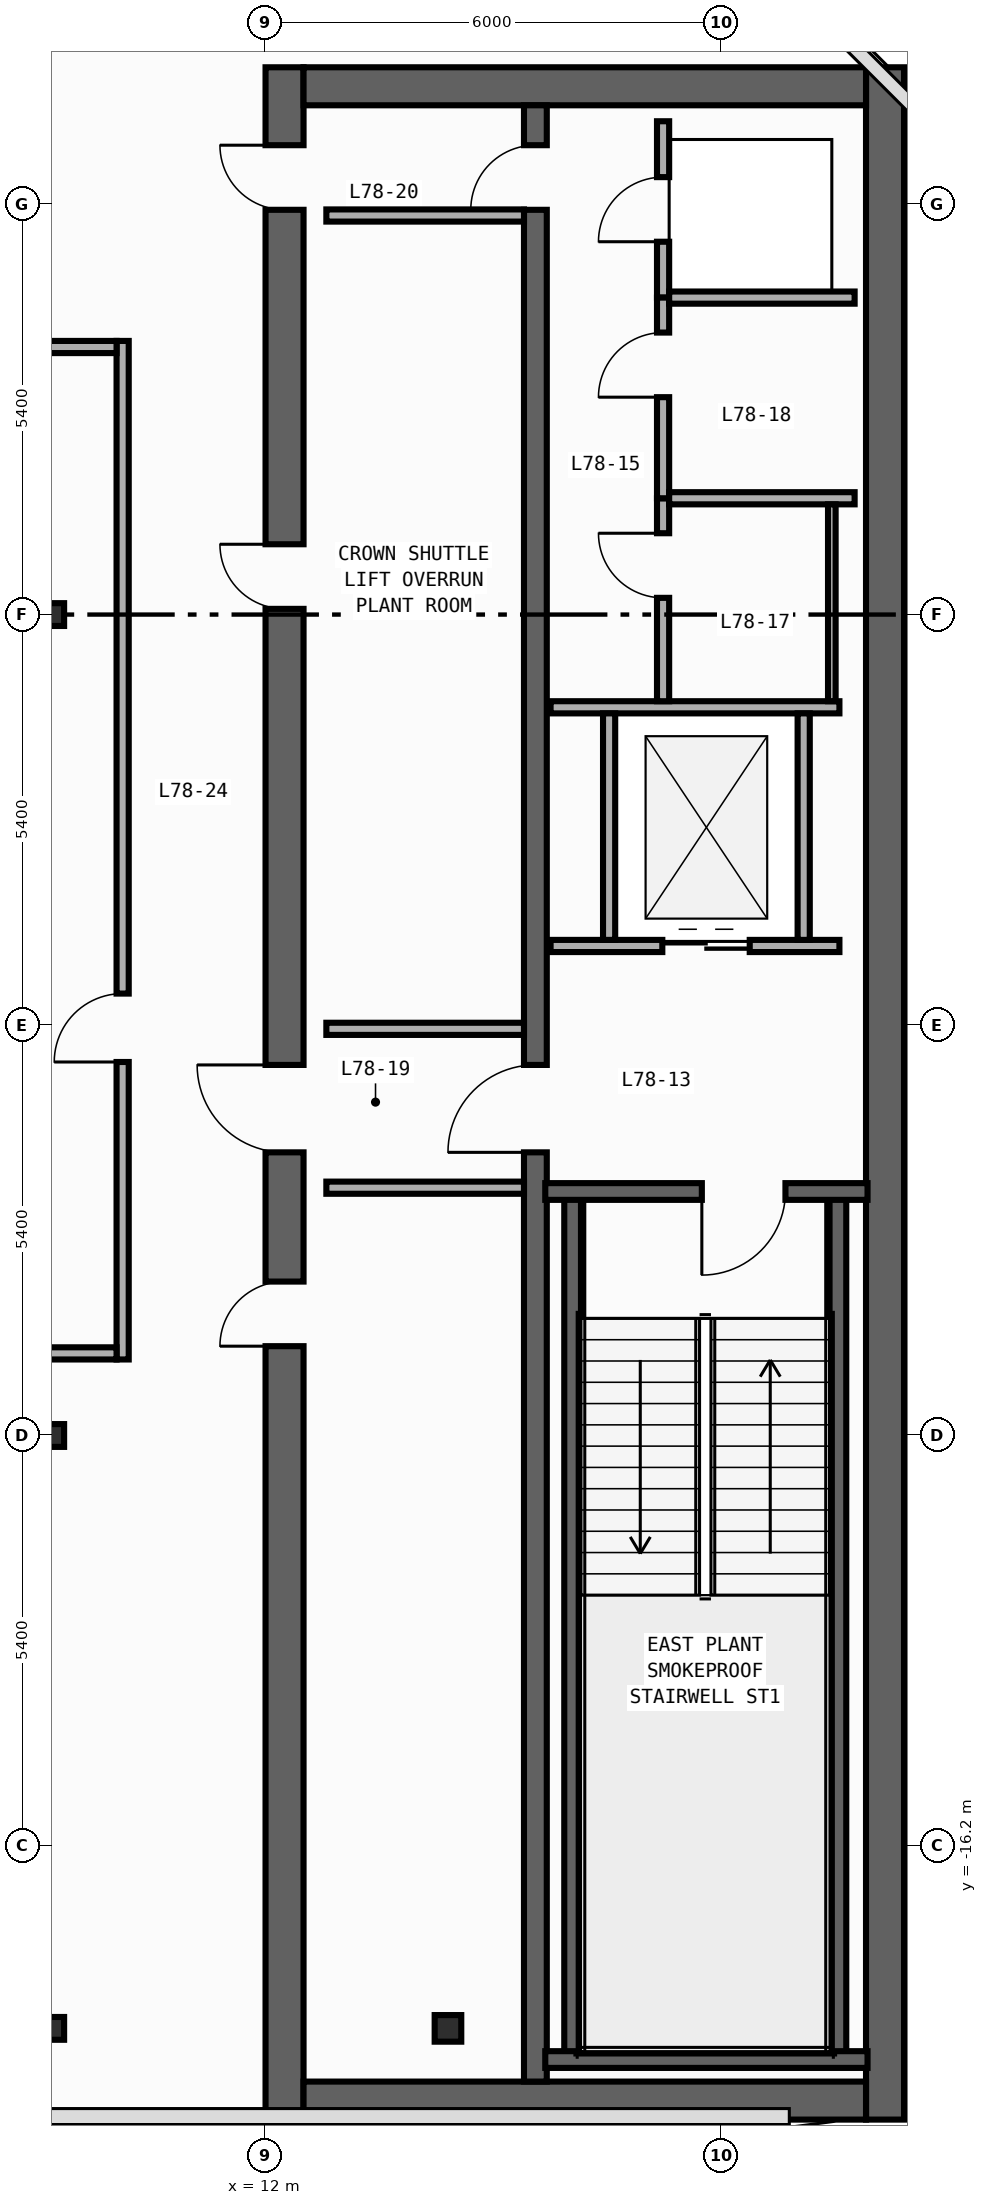
"""IFC4 building model, lengths in metres.
Left out: names, types, materials, properties, quantities, classifications, styles, units other than length and angle.
Written with IfcOpenShell. Run it as: python <this file> out.ifc"""

import sys

from ifc_helpers import new_model, si_unit, direction, frame, frame_2d, origin, origin_2d, place, context, subcontext, project, spatial, rectangle, i_section, extrude, element, fill, save


model = new_model("IFC4")
c1 = context("Model", 3, precision=1e-05, world=origin(), true_north=direction((0.0, 1.0)))
c2 = subcontext(c1, "Body", "Model", "MODEL_VIEW")
j1 = project(units=[si_unit("LENGTHUNIT", "METRE"), si_unit("PLANEANGLEUNIT", "RADIAN")], contexts=[c1])
p1 = place(None, origin())
s1 = spatial("IfcSite", under=j1, at=p1, CompositionType="ELEMENT")
p2 = place(p1, origin())
s2 = spatial("IfcBuilding", under=s1, at=p2, CompositionType="ELEMENT")
p3 = place(p2, frame((0.0, 0.0, 325.2)))
s3 = spatial("IfcBuildingStorey", under=s2, at=p3, CompositionType="ELEMENT", Elevation=325.2)
p4 = place(p3, frame((12.25, -19.8, 0.0), z_axis=(0.0, 0.0, 1.0), x_axis=(0.0, 1.0, 0.0)))
e1 = element("IfcWall", 1, at=p4, inside=s3, PredefinedType="SHEAR", context=c2, shape_type="SweptSolid", body=[
    extrude(rectangle(XDim=27.0, YDim=0.5, at=frame_2d((13.5, 0.0))), origin(), (0.0, 0.0, 1.0), 4.94),
])
p5 = place(p4, frame((19.875, 0.0, 0.0)))
e2 = element("IfcOpeningElement", 2, at=p5, cuts=e1, PredefinedType="OPENING", context=c2, shape_type="SweptSolid", body=[
    extrude(rectangle(XDim=0.85, YDim=2.1, at=frame_2d((0.425, 1.05))), frame((0.0, 0.26, 0.0), z_axis=(0.0, -1.0, 0.0), x_axis=(1.0, 0.0, 0.0)), (0.0, 0.0, 1.0), 0.52),
])
p6 = place(p4, frame((10.175, 0.0, 0.0)))
e3 = element("IfcOpeningElement", 3, at=p6, cuts=e1, PredefinedType="OPENING", context=c2, shape_type="SweptSolid", body=[
    extrude(rectangle(XDim=0.85, YDim=2.1, at=frame_2d((0.425, 1.05))), frame((0.0, 0.26, 0.0), z_axis=(0.0, -1.0, 0.0), x_axis=(1.0, 0.0, 0.0)), (0.0, 0.0, 1.0), 0.52),
])
p7 = place(p4, frame((12.725, 0.0, 0.0)))
e4 = element("IfcOpeningElement", 4, at=p7, cuts=e1, PredefinedType="OPENING", context=c2, shape_type="SweptSolid", body=[
    extrude(rectangle(XDim=1.15, YDim=2.2, at=frame_2d((0.575, 1.1))), frame((0.0, 0.26, 0.0), z_axis=(0.0, -1.0, 0.0), x_axis=(1.0, 0.0, 0.0)), (0.0, 0.0, 1.0), 0.52),
])
p8 = place(p4, frame((25.125, 0.0, 0.0)))
e5 = element("IfcOpeningElement", 5, at=p8, cuts=e1, PredefinedType="OPENING", context=c2, shape_type="SweptSolid", body=[
    extrude(rectangle(XDim=0.85, YDim=2.1, at=frame_2d((0.425, 1.05))), frame((0.0, 0.26, 0.0), z_axis=(0.0, -1.0, 0.0), x_axis=(1.0, 0.0, 0.0)), (0.0, 0.0, 1.0), 0.52),
])
p9 = place(p3, frame((20.15, -19.8, 0.0), z_axis=(0.0, 0.0, 1.0), x_axis=(0.0, 1.0, 0.0)))
e6 = element("IfcWall", 6, at=p9, inside=s3, PredefinedType="SHEAR", context=c2, shape_type="SweptSolid", body=[
    extrude(rectangle(XDim=27.0, YDim=0.5, at=frame_2d((13.5, 0.0))), origin(), (0.0, 0.0, 1.0), 4.94),
])
for number, where, z_axis, x_axis in (
    (7, (12.5, -19.55, 0.0), (0.0, 0.0, 1.0), (1.0, 0.0, 0.0)),
    (8, (12.5, 6.95, 0.0), (0.0, 0.0, 1.0), (1.0, 0.0, 0.0)),
):
    element("IfcWall", number, at=place(p3, frame(where, z_axis=z_axis, x_axis=x_axis)), inside=s3, PredefinedType="SHEAR", context=c2, shape_type="SweptSolid", body=[
        extrude(rectangle(XDim=7.4, YDim=0.5, at=frame_2d((3.7, 0.0))), origin(), (0.0, 0.0, 1.0), 4.94),
    ])
p10 = place(p3, frame((15.55, -19.3, 0.0), z_axis=(0.0, 0.0, 1.0), x_axis=(0.0, 1.0, 0.0)))
e9 = element("IfcWall", 9, at=p10, inside=s3, PredefinedType="SHEAR", context=c2, shape_type="SweptSolid", body=[
    extrude(rectangle(XDim=26.0, YDim=0.3, at=frame_2d((13.0, 0.0))), origin(), (0.0, 0.0, 1.0), 4.94),
])
p11 = place(p10, frame((12.225, 0.0, 0.0)))
e10 = element("IfcOpeningElement", 10, at=p11, cuts=e9, PredefinedType="OPENING", context=c2, shape_type="SweptSolid", body=[
    extrude(rectangle(XDim=1.15, YDim=2.2, at=frame_2d((0.575, 1.1))), frame((0.0, 0.16, 0.0), z_axis=(0.0, -1.0, 0.0), x_axis=(1.0, 0.0, 0.0)), (0.0, 0.0, 1.0), 0.32),
])
p12 = place(p10, frame((24.625, 0.0, 0.0)))
e11 = element("IfcOpeningElement", 11, at=p12, cuts=e9, PredefinedType="OPENING", context=c2, shape_type="SweptSolid", body=[
    extrude(rectangle(XDim=0.85, YDim=2.1, at=frame_2d((0.425, 1.05))), frame((0.0, 0.16, 0.0), z_axis=(0.0, -1.0, 0.0), x_axis=(1.0, 0.0, 0.0)), (0.0, 0.0, 1.0), 0.32),
])
for number, where, z_axis, x_axis in (
    (12, (16.04, -19.01, 0.0), (0.0, 0.0, 1.0), (0.0, 1.0, 0.0)),
    (13, (19.53, -19.01, 0.0), (0.0, 0.0, 1.0), (0.0, 1.0, 0.0)),
):
    element("IfcWall", number, at=place(p3, frame(where, z_axis=z_axis, x_axis=x_axis)), inside=s3, PredefinedType="SHEAR", context=c2, shape_type="SweptSolid", body=[
        extrude(rectangle(XDim=11.42, YDim=0.22, at=frame_2d((5.71, 0.0))), origin(), (0.0, 0.0, 1.0), 4.94),
    ])
p13 = place(p3, frame((15.68, -19.01, 0.0), z_axis=(0.0, 0.0, 1.0), x_axis=(1.0, 0.0, 0.0)))
e14 = element("IfcWall", 14, at=p13, inside=s3, PredefinedType="SHEAR", context=c2, shape_type="SweptSolid", body=[
    extrude(rectangle(XDim=4.24, YDim=0.22, at=frame_2d((2.12, 0.0))), origin(), (0.0, 0.0, 1.0), 4.94),
])
p14 = place(p3, frame((19.92, -7.59, 0.0), z_axis=(0.0, 0.0, 1.0), x_axis=(-1.0, 0.0, 0.0)))
e15 = element("IfcWall", 15, at=p14, inside=s3, PredefinedType="SHEAR", context=c2, shape_type="SweptSolid", body=[
    extrude(rectangle(XDim=4.24, YDim=0.22, at=frame_2d((2.12, 0.0))), origin(), (0.0, 0.0, 1.0), 4.94),
])
p15 = place(p14, frame((1.08, 0.0, 0.0)))
e16 = element("IfcOpeningElement", 16, at=p15, cuts=e15, PredefinedType="OPENING", context=c2, shape_type="SweptSolid", body=[
    extrude(rectangle(XDim=1.1, YDim=2.2, at=frame_2d((0.55, 1.1))), frame((0.0, 0.12, 0.0), z_axis=(0.0, -1.0, 0.0), x_axis=(1.0, 0.0, 0.0)), (0.0, 0.0, 1.0), 0.24),
])
for number, where, z_axis, x_axis in (
    (17, (9.2, -18.6, 0.0), (0.0, 0.0, 1.0), (1.0, 0.0, 0.0)),
    (18, (9.2, -10.8, 0.0), (0.0, 0.0, 1.0), (1.0, 0.0, 0.0)),
    (19, (9.2, 0.0, 0.0), (0.0, 0.0, 1.0), (1.0, 0.0, 0.0)),
):
    element("IfcColumn", number, at=place(p3, frame(where, z_axis=z_axis, x_axis=x_axis)), inside=s3, PredefinedType="COLUMN", context=c2, shape_type="SweptSolid", body=[
        extrude(i_section(OverallWidth=0.3, OverallDepth=0.3, WebThickness=0.01, FlangeThickness=0.015, FilletRadius=0.018, at=origin_2d()), origin(), (0.0, 0.0, 1.0), 5.2),
    ])
p16 = place(p3, frame((14.4, -18.6, 0.0), z_axis=(0.0, 0.0, 1.0), x_axis=(1.0, 0.0, 0.0)))
e20 = element("IfcColumn", 20, at=p16, inside=s3, PredefinedType="COLUMN", context=c2, shape_type="SweptSolid", body=[
    extrude(i_section(OverallWidth=0.35, OverallDepth=0.35, WebThickness=0.012, FlangeThickness=0.019, FilletRadius=0.02, at=origin_2d()), origin(), (0.0, 0.0, 1.0), 5.2),
])
p17 = place(p3, frame((15.75, -4.36, 0.0), z_axis=(0.0, 0.0, 1.0), x_axis=(1.0, 0.0, 0.0)))
e21 = element("IfcWall", 21, at=p17, inside=s3, PredefinedType="STANDARD", context=c2, shape_type="SweptSolid", body=[
    extrude(rectangle(XDim=3.8, YDim=0.16, at=frame_2d((1.9, 0.0))), origin(), (0.0, 0.0, 1.0), 4.94),
])
p18 = place(p17, frame((1.47, 0.0, 0.0)))
e22 = element("IfcOpeningElement", 22, at=p18, cuts=e21, PredefinedType="OPENING", context=c2, shape_type="SweptSolid", body=[
    extrude(rectangle(XDim=1.15, YDim=2.2, at=frame_2d((0.575, 1.1))), frame((0.0, 0.09, 0.0), z_axis=(0.0, -1.0, 0.0), x_axis=(1.0, 0.0, 0.0)), (0.0, 0.0, 1.0), 0.18),
])
p19 = place(p3, frame((15.75, -1.22, 0.0), z_axis=(0.0, 0.0, 1.0), x_axis=(1.0, 0.0, 0.0)))
e23 = element("IfcWall", 23, at=p19, inside=s3, PredefinedType="STANDARD", context=c2, shape_type="SweptSolid", body=[
    extrude(rectangle(XDim=3.8, YDim=0.16, at=frame_2d((1.9, 0.0))), origin(), (0.0, 0.0, 1.0), 4.94),
])
for number, where, z_axis, x_axis in (
    (24, (16.52, -4.28, 0.0), (0.0, 0.0, 1.0), (0.0, 1.0, 0.0)),
    (25, (19.08, -4.28, 0.0), (0.0, 0.0, 1.0), (0.0, 1.0, 0.0)),
):
    element("IfcWall", number, at=place(p3, frame(where, z_axis=z_axis, x_axis=x_axis)), inside=s3, PredefinedType="STANDARD", context=c2, shape_type="SweptSolid", body=[
        extrude(rectangle(XDim=2.98, YDim=0.16, at=frame_2d((1.49, 0.0))), origin(), (0.0, 0.0, 1.0), 4.94),
    ])
for number, where, z_axis, x_axis in (
    (26, (12.8, -5.45, 0.0), (0.0, 0.0, 1.0), (1.0, 0.0, 0.0)),
    (27, (12.8, -7.54, 0.0), (0.0, 0.0, 1.0), (1.0, 0.0, 0.0)),
    (28, (12.8, 5.25, 0.0), (0.0, 0.0, 1.0), (1.0, 0.0, 0.0)),
):
    element("IfcWall", number, at=place(p3, frame(where, z_axis=z_axis, x_axis=x_axis)), inside=s3, PredefinedType="STANDARD", context=c2, shape_type="SweptSolid", body=[
        extrude(rectangle(XDim=2.6, YDim=0.16, at=frame_2d((1.3, 0.0))), origin(), (0.0, 0.0, 1.0), 4.94),
    ])
p20 = place(p3, frame((17.23, 4.17, 0.0), z_axis=(0.0, 0.0, 1.0), x_axis=(0.0, 1.0, 0.0)))
e29 = element("IfcWall", 29, at=p20, inside=s3, PredefinedType="PARTITIONING", context=c2, shape_type="SweptSolid", body=[
    extrude(rectangle(XDim=2.32, YDim=0.16, at=frame_2d((1.16, 0.0))), origin(), (0.0, 0.0, 1.0), 4.94),
])
p21 = place(p20, frame((0.735, 0.0, 0.0)))
e30 = element("IfcOpeningElement", 30, at=p21, cuts=e29, PredefinedType="OPENING", context=c2, shape_type="SweptSolid", body=[
    extrude(rectangle(XDim=0.85, YDim=2.1, at=frame_2d((0.425, 1.05))), frame((0.0, 0.09, 0.0), z_axis=(0.0, -1.0, 0.0), x_axis=(1.0, 0.0, 0.0)), (0.0, 0.0, 1.0), 0.18),
])
p22 = place(p3, frame((17.23, -1.14, 0.0), z_axis=(0.0, 0.0, 1.0), x_axis=(0.0, 1.0, 0.0)))
e31 = element("IfcWall", 31, at=p22, inside=s3, PredefinedType="PARTITIONING", context=c2, shape_type="SweptSolid", body=[
    extrude(rectangle(XDim=2.67, YDim=0.16, at=frame_2d((1.335, 0.0))), origin(), (0.0, 0.0, 1.0), 4.94),
])
p23 = place(p22, frame((1.36, 0.0, 0.0)))
e32 = element("IfcOpeningElement", 32, at=p23, cuts=e31, PredefinedType="OPENING", context=c2, shape_type="SweptSolid", body=[
    extrude(rectangle(XDim=0.85, YDim=2.1, at=frame_2d((0.425, 1.05))), frame((0.0, 0.09, 0.0), z_axis=(0.0, -1.0, 0.0), x_axis=(1.0, 0.0, 0.0)), (0.0, 0.0, 1.0), 0.18),
])
p24 = place(p3, frame((17.23, 1.53, 0.0), z_axis=(0.0, 0.0, 1.0), x_axis=(0.0, 1.0, 0.0)))
e33 = element("IfcWall", 33, at=p24, inside=s3, PredefinedType="PARTITIONING", context=c2, shape_type="SweptSolid", body=[
    extrude(rectangle(XDim=2.64, YDim=0.16, at=frame_2d((1.32, 0.0))), origin(), (0.0, 0.0, 1.0), 4.94),
])
p25 = place(p24, frame((1.33, 0.0, 0.0)))
e34 = element("IfcOpeningElement", 34, at=p25, cuts=e33, PredefinedType="OPENING", context=c2, shape_type="SweptSolid", body=[
    extrude(rectangle(XDim=0.85, YDim=2.1, at=frame_2d((0.425, 1.05))), frame((0.0, 0.09, 0.0), z_axis=(0.0, -1.0, 0.0), x_axis=(1.0, 0.0, 0.0)), (0.0, 0.0, 1.0), 0.18),
])
for number, where, z_axis, x_axis in (
    (35, (17.31, 4.17, 0.0), (0.0, 0.0, 1.0), (1.0, 0.0, 0.0)),
    (36, (17.31, 1.53, 0.0), (0.0, 0.0, 1.0), (1.0, 0.0, 0.0)),
):
    element("IfcWall", number, at=place(p3, frame(where, z_axis=z_axis, x_axis=x_axis)), inside=s3, PredefinedType="PARTITIONING", context=c2, shape_type="SweptSolid", body=[
        extrude(rectangle(XDim=2.44, YDim=0.16, at=frame_2d((1.22, 0.0))), origin(), (0.0, 0.0, 1.0), 4.94),
    ])
p26 = place(p3, frame((10.12, -9.8, 0.0), z_axis=(0.0, 0.0, 1.0), x_axis=(0.0, 1.0, 0.0)))
e37 = element("IfcWall", 37, at=p26, inside=s3, PredefinedType="PARTITIONING", context=c2, shape_type="SweptSolid", body=[
    extrude(rectangle(XDim=13.4, YDim=0.16, at=frame_2d((6.7, 0.0))), origin(), (0.0, 0.0, 1.0), 4.94),
])
p27 = place(p26, frame((3.914, 0.0, 0.0)))
e38 = element("IfcOpeningElement", 38, at=p27, cuts=e37, PredefinedType="OPENING", context=c2, shape_type="SweptSolid", body=[
    extrude(rectangle(XDim=0.9, YDim=2.15, at=frame_2d((0.45, 1.075))), frame((0.0, 0.09, 0.0), z_axis=(0.0, -1.0, 0.0), x_axis=(1.0, 0.0, 0.0)), (0.0, 0.0, 1.0), 0.18),
])
p28 = place(p3, frame((-10.04, 3.52, 0.0), z_axis=(0.0, 0.0, 1.0), x_axis=(1.0, 0.0, 0.0)))
e39 = element("IfcWall", 39, at=p28, inside=s3, PredefinedType="PARTITIONING", context=c2, shape_type="SweptSolid", body=[
    extrude(rectangle(XDim=20.08, YDim=0.16, at=frame_2d((10.04, 0.0))), origin(), (0.0, 0.0, 1.0), 4.94),
])
p29 = place(p28, frame((9.49, 0.0, 0.0)))
e40 = element("IfcOpeningElement", 40, at=p29, cuts=e39, PredefinedType="OPENING", context=c2, shape_type="SweptSolid", body=[
    extrude(rectangle(XDim=0.9, YDim=2.15, at=frame_2d((0.45, 1.075))), frame((0.0, 0.09, 0.0), z_axis=(0.0, -1.0, 0.0), x_axis=(1.0, 0.0, 0.0)), (0.0, 0.0, 1.0), 0.18),
])
p30 = place(p3, frame((-10.04, -9.72, 0.0), z_axis=(0.0, 0.0, 1.0), x_axis=(1.0, 0.0, 0.0)))
e41 = element("IfcWall", 41, at=p30, inside=s3, PredefinedType="PARTITIONING", context=c2, shape_type="SweptSolid", body=[
    extrude(rectangle(XDim=20.08, YDim=0.16, at=frame_2d((10.04, 0.0))), origin(), (0.0, 0.0, 1.0), 4.94),
])
p31 = place(p30, frame((9.49, 0.0, 0.0)))
e42 = element("IfcOpeningElement", 42, at=p31, cuts=e41, PredefinedType="OPENING", context=c2, shape_type="SweptSolid", body=[
    extrude(rectangle(XDim=0.9, YDim=2.15, at=frame_2d((0.45, 1.075))), frame((0.0, 0.09, 0.0), z_axis=(0.0, -1.0, 0.0), x_axis=(1.0, 0.0, 0.0)), (0.0, 0.0, 1.0), 0.18),
])
p32 = place(p3, frame((19.45, 1.45, 0.0), z_axis=(0.0, 0.0, 1.0), x_axis=(0.0, -1.0, 0.0)))
e43 = element("IfcWall", 43, at=p32, inside=s3, PredefinedType="PARTITIONING", context=c2, shape_type="SweptSolid", body=[
    extrude(rectangle(XDim=2.59, YDim=0.1, at=frame_2d((1.295, 0.0))), origin(), (0.0, 0.0, 1.0), 4.94),
])
p33 = place(p15, origin())
e44 = element("IfcDoor", 44, at=p33, inside=s3, OperationType="SINGLE_SWING_RIGHT", PredefinedType="DOOR", context=c2, shape_type="SweptSolid", body=[
    extrude(rectangle(XDim=1.1, YDim=2.2, at=frame_2d((0.55, 1.1))), frame((0.0, 0.025, 0.0), z_axis=(0.0, -1.0, 0.0), x_axis=(1.0, 0.0, 0.0)), (0.0, 0.0, 1.0), 0.05),
])
fill(e16, e44)
p34 = place(p5, origin())
e45 = element("IfcDoor", 45, at=p34, inside=s3, OperationType="SINGLE_SWING_RIGHT", PredefinedType="DOOR", context=c2, shape_type="SweptSolid", body=[
    extrude(rectangle(XDim=0.85, YDim=2.1, at=frame_2d((0.425, 1.05))), frame((0.0, 0.025, 0.0), z_axis=(0.0, -1.0, 0.0), x_axis=(1.0, 0.0, 0.0)), (0.0, 0.0, 1.0), 0.05),
])
fill(e2, e45)
p35 = place(p6, origin())
e46 = element("IfcDoor", 46, at=p35, inside=s3, OperationType="SINGLE_SWING_LEFT", PredefinedType="DOOR", context=c2, shape_type="SweptSolid", body=[
    extrude(rectangle(XDim=0.85, YDim=2.1, at=frame_2d((0.425, 1.05))), frame((0.0, 0.025, 0.0), z_axis=(0.0, -1.0, 0.0), x_axis=(1.0, 0.0, 0.0)), (0.0, 0.0, 1.0), 0.05),
])
fill(e3, e46)
p36 = place(p7, origin())
e47 = element("IfcDoor", 47, at=p36, inside=s3, OperationType="SINGLE_SWING_RIGHT", PredefinedType="DOOR", context=c2, shape_type="SweptSolid", body=[
    extrude(rectangle(XDim=1.15, YDim=2.2, at=frame_2d((0.575, 1.1))), frame((0.0, 0.025, 0.0), z_axis=(0.0, -1.0, 0.0), x_axis=(1.0, 0.0, 0.0)), (0.0, 0.0, 1.0), 0.05),
])
fill(e4, e47)
p37 = place(p11, origin())
e48 = element("IfcDoor", 48, at=p37, inside=s3, OperationType="SINGLE_SWING_LEFT", PredefinedType="DOOR", context=c2, shape_type="SweptSolid", body=[
    extrude(rectangle(XDim=1.15, YDim=2.2, at=frame_2d((0.575, 1.1))), frame((0.0, 0.025, 0.0), z_axis=(0.0, -1.0, 0.0), x_axis=(1.0, 0.0, 0.0)), (0.0, 0.0, 1.0), 0.05),
])
fill(e10, e48)
p38 = place(p8, origin())
e49 = element("IfcDoor", 49, at=p38, inside=s3, OperationType="SINGLE_SWING_RIGHT", PredefinedType="DOOR", context=c2, shape_type="SweptSolid", body=[
    extrude(rectangle(XDim=0.85, YDim=2.1, at=frame_2d((0.425, 1.05))), frame((0.0, 0.025, 0.0), z_axis=(0.0, -1.0, 0.0), x_axis=(1.0, 0.0, 0.0)), (0.0, 0.0, 1.0), 0.05),
])
fill(e5, e49)
p39 = place(p12, origin())
e50 = element("IfcDoor", 50, at=p39, inside=s3, OperationType="SINGLE_SWING_LEFT", PredefinedType="DOOR", context=c2, shape_type="SweptSolid", body=[
    extrude(rectangle(XDim=0.85, YDim=2.1, at=frame_2d((0.425, 1.05))), frame((0.0, 0.025, 0.0), z_axis=(0.0, -1.0, 0.0), x_axis=(1.0, 0.0, 0.0)), (0.0, 0.0, 1.0), 0.05),
])
fill(e11, e50)
p40 = place(p18, origin())
e51 = element("IfcDoor", 51, at=p40, inside=s3, OperationType="DOUBLE_DOOR_SLIDING", PredefinedType="DOOR", context=c2, shape_type="SweptSolid", body=[
    extrude(rectangle(XDim=1.15, YDim=2.2, at=frame_2d((0.575, 1.1))), frame((0.0, 0.025, 0.0), z_axis=(0.0, -1.0, 0.0), x_axis=(1.0, 0.0, 0.0)), (0.0, 0.0, 1.0), 0.05),
])
fill(e22, e51)
p41 = place(p21, origin())
e52 = element("IfcDoor", 52, at=p41, inside=s3, OperationType="SINGLE_SWING_LEFT", PredefinedType="DOOR", context=c2, shape_type="SweptSolid", body=[
    extrude(rectangle(XDim=0.85, YDim=2.1, at=frame_2d((0.425, 1.05))), frame((0.0, 0.025, 0.0), z_axis=(0.0, -1.0, 0.0), x_axis=(1.0, 0.0, 0.0)), (0.0, 0.0, 1.0), 0.05),
])
fill(e30, e52)
p42 = place(p23, origin())
e53 = element("IfcDoor", 53, at=p42, inside=s3, OperationType="SINGLE_SWING_RIGHT", PredefinedType="DOOR", context=c2, shape_type="SweptSolid", body=[
    extrude(rectangle(XDim=0.85, YDim=2.1, at=frame_2d((0.425, 1.05))), frame((0.0, 0.025, 0.0), z_axis=(0.0, -1.0, 0.0), x_axis=(1.0, 0.0, 0.0)), (0.0, 0.0, 1.0), 0.05),
])
fill(e32, e53)
p43 = place(p25, origin())
e54 = element("IfcDoor", 54, at=p43, inside=s3, OperationType="SINGLE_SWING_LEFT", PredefinedType="DOOR", context=c2, shape_type="SweptSolid", body=[
    extrude(rectangle(XDim=0.85, YDim=2.1, at=frame_2d((0.425, 1.05))), frame((0.0, 0.025, 0.0), z_axis=(0.0, -1.0, 0.0), x_axis=(1.0, 0.0, 0.0)), (0.0, 0.0, 1.0), 0.05),
])
fill(e34, e54)
p44 = place(p27, origin())
e55 = element("IfcDoor", 55, at=p44, inside=s3, OperationType="SINGLE_SWING_LEFT", PredefinedType="DOOR", context=c2, shape_type="SweptSolid", body=[
    extrude(rectangle(XDim=0.9, YDim=2.15, at=frame_2d((0.45, 1.075))), frame((0.0, 0.025, 0.0), z_axis=(0.0, -1.0, 0.0), x_axis=(1.0, 0.0, 0.0)), (0.0, 0.0, 1.0), 0.05),
])
fill(e38, e55)
save(model, sys.argv[1])
